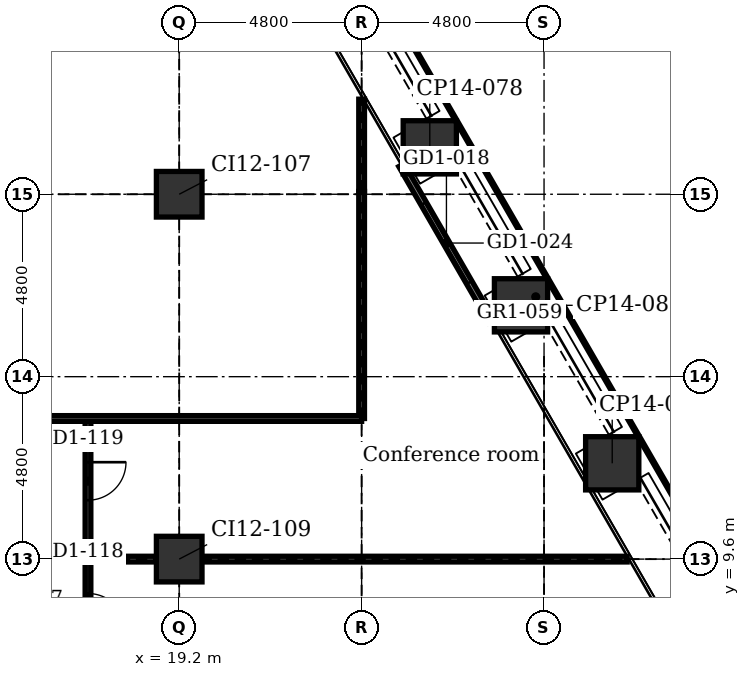
"""IFC4 building model, lengths in metres.
Left out: names, types, materials, properties, quantities, classifications, styles, units other than length and angle.
Written with IfcOpenShell. Run it as: python <this file> out.ifc"""

import sys

from ifc_helpers import new_model, si_unit, direction, frame, frame_2d, origin, origin_2d, place, context, subcontext, project, spatial, rectangle, extrude, element, fill, save


model = new_model("IFC4")
c1 = context("Model", 3, precision=1e-05, world=origin(), true_north=direction((0.0, 1.0)))
c2 = subcontext(c1, "Body", "Model", "MODEL_VIEW")
j1 = project(units=[si_unit("LENGTHUNIT", "METRE"), si_unit("PLANEANGLEUNIT", "RADIAN")], contexts=[c1])
p1 = place(None, origin())
s1 = spatial("IfcSite", under=j1, at=p1, CompositionType="ELEMENT")
p2 = place(p1, origin())
s2 = spatial("IfcBuilding", under=s1, at=p2, CompositionType="ELEMENT")
p3 = place(p2, frame((0.0, 0.0, 44.4)))
s3 = spatial("IfcBuildingStorey", under=s2, at=p3, CompositionType="ELEMENT", Elevation=44.4)
for number, where, z_axis, x_axis in (
    (1, (25.794, 20.435, -0.25), (0.0, 0.0, 1.0), (0.866, 0.5, 0.0)),
    (2, (28.194, 16.278, -0.25), (0.0, 0.0, 1.0), (0.866, 0.5, 0.0)),
    (3, (30.594, 12.121, -0.25), (0.0, 0.0, 1.0), (0.866, 0.5, 0.0)),
    (4, (32.994, 7.964, -0.25), (0.0, 0.0, 1.0), (0.866, 0.5, 0.0)),
):
    element("IfcColumn", number, at=place(p3, frame(where, z_axis=z_axis, x_axis=x_axis)), inside=s3, PredefinedType="COLUMN", context=c2, shape_type="SweptSolid", body=[
        extrude(rectangle(XDim=1.4, YDim=1.4, at=origin_2d()), origin(), (0.0, 0.0, 1.0), 5.5),
    ])
for number, where, z_axis, x_axis in (
    (5, (19.2, 9.6, -0.25), (0.0, 0.0, 1.0), (1.0, 0.0, 0.0)),
    (6, (19.2, 19.2, -0.25), (0.0, 0.0, 1.0), (1.0, 0.0, 0.0)),
):
    element("IfcColumn", number, at=place(p3, frame(where, z_axis=z_axis, x_axis=x_axis)), inside=s3, PredefinedType="COLUMN", context=c2, shape_type="SweptSolid", body=[
        extrude(rectangle(XDim=1.2, YDim=1.2, at=origin_2d()), origin(), (0.0, 0.0, 1.0), 5.5),
    ])
p4 = place(p3, frame((25.047, 19.969, 0.0), z_axis=(0.0, 0.0, 1.0), x_axis=(0.5000167099, -0.866015756104, 0.0)))
e7 = element("IfcWall", 7, at=p4, inside=s3, PredefinedType="PARTITIONING", context=c2, shape_type="SweptSolid", body=[
    extrude(rectangle(XDim=4.74, YDim=0.16, at=frame_2d((2.37, 0.0))), origin(), (0.0, 0.0, 1.0), 5.25),
])
p5 = place(p4, frame((1.17, 0.0, 0.0)))
e8 = element("IfcOpeningElement", 8, at=p5, cuts=e7, PredefinedType="OPENING", context=c2, shape_type="SweptSolid", body=[
    extrude(rectangle(XDim=2.4, YDim=2.4, at=frame_2d((1.2, 1.2))), frame((0.0, 0.09, 0.0), z_axis=(0.0, -1.0, 0.0), x_axis=(1.0, 0.0, 0.0)), (0.0, 0.0, 1.0), 0.18),
])
p6 = place(p3, frame((24.0, 13.3, 0.0), z_axis=(0.0, 0.0, 1.0), x_axis=(0.0, 1.0, 0.0)))
e9 = element("IfcWall", 9, at=p6, inside=s3, PredefinedType="PARTITIONING", context=c2, shape_type="SweptSolid", body=[
    extrude(rectangle(XDim=5.974, YDim=0.15, at=frame_2d((2.987, 0.0))), origin(), (0.0, 0.0, 1.0), 4.717),
])
p7 = place(p3, frame((24.0, 19.274, 0.0), z_axis=(0.0, 0.0, 1.0), x_axis=(0.0, 1.0, 0.0)))
e10 = element("IfcWall", 10, at=p7, inside=s3, PredefinedType="PARTITIONING", context=c2, shape_type="SweptSolid", body=[
    extrude(rectangle(XDim=2.427, YDim=0.15, at=frame_2d((1.214, 0.0))), origin(), (0.0, 0.0, 1.0), 4.94),
])
p8 = place(p3, frame((16.8, 3.95, 0.0), z_axis=(0.0, 0.0, 1.0), x_axis=(0.0, 1.0, 0.0)))
e11 = element("IfcWall", 11, at=p8, inside=s3, PredefinedType="PARTITIONING", context=c2, shape_type="SweptSolid", body=[
    extrude(rectangle(XDim=9.35, YDim=0.15, at=frame_2d((4.675, 0.0))), origin(), (0.0, 0.0, 1.0), 5.25),
])
p9 = place(p8, frame((1.275, 0.0, 0.0)))
e12 = element("IfcOpeningElement", 12, at=p9, cuts=e11, PredefinedType="OPENING", context=c2, shape_type="SweptSolid", body=[
    extrude(rectangle(XDim=1.0, YDim=2.1, at=frame_2d((0.5, 1.05))), frame((0.0, 0.085, 0.0), z_axis=(0.0, -1.0, 0.0), x_axis=(1.0, 0.0, 0.0)), (0.0, 0.0, 1.0), 0.17),
])
p10 = place(p8, frame((3.745, 0.0, 0.0)))
e13 = element("IfcOpeningElement", 13, at=p10, cuts=e11, PredefinedType="OPENING", context=c2, shape_type="SweptSolid", body=[
    extrude(rectangle(XDim=1.0, YDim=2.1, at=frame_2d((0.5, 1.05))), frame((0.0, 0.085, 0.0), z_axis=(0.0, -1.0, 0.0), x_axis=(1.0, 0.0, 0.0)), (0.0, 0.0, 1.0), 0.17),
])
p11 = place(p8, frame((7.2, 0.0, 0.0)))
e14 = element("IfcOpeningElement", 14, at=p11, cuts=e11, PredefinedType="OPENING", context=c2, shape_type="SweptSolid", body=[
    extrude(rectangle(XDim=1.0, YDim=2.1, at=frame_2d((0.5, 1.05))), frame((0.0, 0.085, 0.0), z_axis=(0.0, -1.0, 0.0), x_axis=(1.0, 0.0, 0.0)), (0.0, 0.0, 1.0), 0.17),
])
p12 = place(p3, frame((16.8, 9.6, 0.0), z_axis=(0.0, 0.0, 1.0), x_axis=(1.0, 0.0, 0.0)))
e15 = element("IfcWall", 15, at=p12, inside=s3, PredefinedType="PARTITIONING", context=c2, shape_type="SweptSolid", body=[
    extrude(rectangle(XDim=1.8, YDim=0.15, at=frame_2d((0.9, 0.0))), origin(), (0.0, 0.0, 1.0), 4.642),
])
p13 = place(p3, frame((19.8, 9.6, 0.0), z_axis=(0.0, 0.0, 1.0), x_axis=(1.0, 0.0, 0.0)))
e16 = element("IfcWall", 16, at=p13, inside=s3, PredefinedType="PARTITIONING", context=c2, shape_type="SweptSolid", body=[
    extrude(rectangle(XDim=11.187, YDim=0.15, at=frame_2d((5.593, 0.0))), origin(), (0.0, 0.0, 1.0), 4.488),
])
p14 = place(p3, frame((-24.0, 13.3, 0.0), z_axis=(0.0, 0.0, 1.0), x_axis=(1.0, 0.0, 0.0)))
e17 = element("IfcWall", 17, at=p14, inside=s3, PredefinedType="PARTITIONING", context=c2, shape_type="SweptSolid", body=[
    extrude(rectangle(XDim=48.0, YDim=0.15, at=frame_2d((24.0, 0.0))), origin(), (0.0, 0.0, 1.0), 5.25),
])
p15 = place(p14, frame((9.1, 0.0, 0.0)))
e18 = element("IfcOpeningElement", 18, at=p15, cuts=e17, PredefinedType="OPENING", context=c2, shape_type="SweptSolid", body=[
    extrude(rectangle(XDim=1.0, YDim=2.1, at=frame_2d((0.5, 1.05))), frame((0.0, 0.085, 0.0), z_axis=(0.0, -1.0, 0.0), x_axis=(1.0, 0.0, 0.0)), (0.0, 0.0, 1.0), 0.17),
])
p16 = place(p14, frame((12.7, 0.0, 0.0)))
e19 = element("IfcOpeningElement", 19, at=p16, cuts=e17, PredefinedType="OPENING", context=c2, shape_type="SweptSolid", body=[
    extrude(rectangle(XDim=1.0, YDim=2.1, at=frame_2d((0.5, 1.05))), frame((0.0, 0.085, 0.0), z_axis=(0.0, -1.0, 0.0), x_axis=(1.0, 0.0, 0.0)), (0.0, 0.0, 1.0), 0.17),
])
p17 = place(p14, frame((15.675, 0.0, 0.0)))
e20 = element("IfcOpeningElement", 20, at=p17, cuts=e17, PredefinedType="OPENING", context=c2, shape_type="SweptSolid", body=[
    extrude(rectangle(XDim=1.0, YDim=2.1, at=frame_2d((0.5, 1.05))), frame((0.0, 0.085, 0.0), z_axis=(0.0, -1.0, 0.0), x_axis=(1.0, 0.0, 0.0)), (0.0, 0.0, 1.0), 0.17),
])
p18 = place(p14, frame((28.3, 0.0, 0.0)))
e21 = element("IfcOpeningElement", 21, at=p18, cuts=e17, PredefinedType="OPENING", context=c2, shape_type="SweptSolid", body=[
    extrude(rectangle(XDim=1.0, YDim=2.1, at=frame_2d((0.5, 1.05))), frame((0.0, 0.085, 0.0), z_axis=(0.0, -1.0, 0.0), x_axis=(1.0, 0.0, 0.0)), (0.0, 0.0, 1.0), 0.17),
])
p19 = place(p14, frame((37.425, 0.0, 0.0)))
e22 = element("IfcOpeningElement", 22, at=p19, cuts=e17, PredefinedType="OPENING", context=c2, shape_type="SweptSolid", body=[
    extrude(rectangle(XDim=1.8, YDim=2.1, at=frame_2d((0.9, 1.05))), frame((0.0, 0.085, 0.0), z_axis=(0.0, -1.0, 0.0), x_axis=(1.0, 0.0, 0.0)), (0.0, 0.0, 1.0), 0.17),
])
p20 = place(p14, frame((21.15, 0.0, 0.0)))
e23 = element("IfcOpeningElement", 23, at=p20, cuts=e17, PredefinedType="OPENING", context=c2, shape_type="SweptSolid", body=[
    extrude(rectangle(XDim=0.9, YDim=2.1, at=frame_2d((0.45, 1.05))), frame((0.0, 0.085, 0.0), z_axis=(0.0, -1.0, 0.0), x_axis=(1.0, 0.0, 0.0)), (0.0, 0.0, 1.0), 0.17),
])
p21 = place(p14, frame((18.15, 0.0, 0.0)))
e24 = element("IfcOpeningElement", 24, at=p21, cuts=e17, PredefinedType="OPENING", context=c2, shape_type="SweptSolid", body=[
    extrude(rectangle(XDim=0.9, YDim=2.1, at=frame_2d((0.45, 1.05))), frame((0.0, 0.085, 0.0), z_axis=(0.0, -1.0, 0.0), x_axis=(1.0, 0.0, 0.0)), (0.0, 0.0, 1.0), 0.17),
])
p22 = place(p14, frame((25.0, 0.0, 0.9)))
e25 = element("IfcOpeningElement", 25, at=p22, cuts=e17, PredefinedType="OPENING", context=c2, shape_type="SweptSolid", body=[
    extrude(rectangle(XDim=1.8, YDim=1.5, at=frame_2d((0.9, 0.75))), frame((0.0, 0.085, 0.0), z_axis=(0.0, -1.0, 0.0), x_axis=(1.0, 0.0, 0.0)), (0.0, 0.0, 1.0), 0.17),
])
p23 = place(p5, origin())
e26 = element("IfcDoor", 26, at=p23, inside=s3, OperationType="DOUBLE_DOOR_SLIDING", PredefinedType="DOOR", context=c2, shape_type="SweptSolid", body=[
    extrude(rectangle(XDim=2.4, YDim=2.4, at=frame_2d((1.2, 1.2))), frame((0.0, 0.025, 0.0), z_axis=(0.0, -1.0, 0.0), x_axis=(1.0, 0.0, 0.0)), (0.0, 0.0, 1.0), 0.05),
])
fill(e8, e26)
p24 = place(p10, frame((1.0, 0.0, 0.0), z_axis=(0.0, 0.0, 1.0), x_axis=(-1.0, 0.0, 0.0)))
e27 = element("IfcDoor", 27, at=p24, inside=s3, OperationType="SINGLE_SWING_LEFT", PredefinedType="DOOR", context=c2, shape_type="SweptSolid", body=[
    extrude(rectangle(XDim=1.0, YDim=2.1, at=frame_2d((0.5, 1.05))), frame((0.0, 0.025, 0.0), z_axis=(0.0, -1.0, 0.0), x_axis=(1.0, 0.0, 0.0)), (0.0, 0.0, 1.0), 0.05),
])
fill(e13, e27)
p25 = place(p11, frame((1.0, 0.0, 0.0), z_axis=(0.0, 0.0, 1.0), x_axis=(-1.0, 0.0, 0.0)))
e28 = element("IfcDoor", 28, at=p25, inside=s3, OperationType="SINGLE_SWING_RIGHT", PredefinedType="DOOR", context=c2, shape_type="SweptSolid", body=[
    extrude(rectangle(XDim=1.0, YDim=2.1, at=frame_2d((0.5, 1.05))), frame((0.0, 0.025, 0.0), z_axis=(0.0, -1.0, 0.0), x_axis=(1.0, 0.0, 0.0)), (0.0, 0.0, 1.0), 0.05),
])
fill(e14, e28)
save(model, sys.argv[1])
